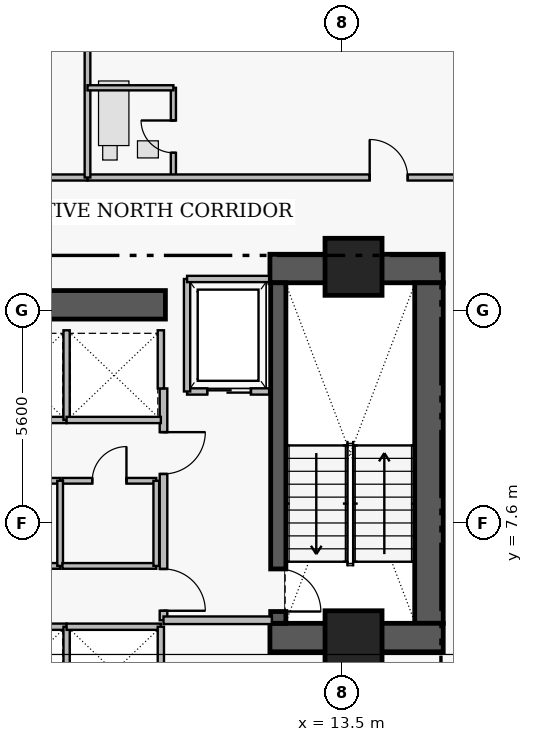
"""IFC4 building model, lengths in metres.
Left out: names, types, materials, properties, quantities, classifications, styles, units other than length and angle.
Written with IfcOpenShell. Run it as: python <this file> out.ifc"""

import sys

from ifc_helpers import new_model, si_unit, direction, frame, frame_2d, origin, origin_2d, place, context, subcontext, project, spatial, rectangle, extrude, element, fill, save


model = new_model("IFC4")
c1 = context("Model", 3, precision=1e-05, world=origin(), true_north=direction((0.0, 1.0)))
c2 = subcontext(c1, "Body", "Model", "MODEL_VIEW")
j1 = project(units=[si_unit("LENGTHUNIT", "METRE"), si_unit("PLANEANGLEUNIT", "RADIAN")], contexts=[c1])
p1 = place(None, origin())
s1 = spatial("IfcSite", under=j1, at=p1, CompositionType="ELEMENT")
p2 = place(p1, origin())
s2 = spatial("IfcBuilding", under=s1, at=p2, CompositionType="ELEMENT")
p3 = place(p2, frame((0.0, 0.0, 143.1)))
s3 = spatial("IfcBuildingStorey", under=s2, at=p3, CompositionType="ELEMENT", Elevation=143.1)
p4 = place(p3, frame((11.6, 14.305, 0.0), z_axis=(0.0, 0.0, 1.0), x_axis=(1.0, 0.0, 0.0)))
e1 = element("IfcWall", 1, at=p4, inside=s3, PredefinedType="SHEAR", context=c2, shape_type="SweptSolid", body=[
    extrude(rectangle(XDim=4.56, YDim=0.75, at=frame_2d((2.28, 0.0))), origin(), (0.0, 0.0, 1.0), 3.46),
])
p5 = place(p3, frame((15.785, 4.97, 0.0), z_axis=(0.0, 0.0, 1.0), x_axis=(0.0, 1.0, 0.0)))
e2 = element("IfcWall", 2, at=p5, inside=s3, PredefinedType="SHEAR", context=c2, shape_type="SweptSolid", body=[
    extrude(rectangle(XDim=8.96, YDim=0.75, at=frame_2d((4.48, 0.0))), origin(), (0.0, 0.0, 1.0), 3.46),
])
p6 = place(p3, frame((11.6, 4.595, 0.0), z_axis=(0.0, 0.0, 1.0), x_axis=(1.0, 0.0, 0.0)))
e3 = element("IfcWall", 3, at=p6, inside=s3, PredefinedType="SHEAR", context=c2, shape_type="SweptSolid", body=[
    extrude(rectangle(XDim=4.56, YDim=0.75, at=frame_2d((2.28, 0.0))), origin(), (0.0, 0.0, 1.0), 3.46),
])
p7 = place(p3, frame((1.25, 13.35, 0.0), z_axis=(0.0, 0.0, 1.0), x_axis=(1.0, 0.0, 0.0)))
e4 = element("IfcWall", 4, at=p7, inside=s3, PredefinedType="SHEAR", context=c2, shape_type="SweptSolid", body=[
    extrude(rectangle(XDim=7.6, YDim=0.75, at=frame_2d((3.8, 0.0))), origin(), (0.0, 0.0, 1.0), 3.43),
])
p8 = place(p3, frame((11.82, 13.93, 0.0), z_axis=(0.0, 0.0, 1.0), x_axis=(0.0, -1.0, 0.0)))
e5 = element("IfcWall", 5, at=p8, inside=s3, PredefinedType="SHEAR", context=c2, shape_type="SweptSolid", body=[
    extrude(rectangle(XDim=8.96, YDim=0.4, at=frame_2d((4.48, 0.0))), origin(), (0.0, 0.0, 1.0), 3.46),
])
p9 = place(p8, frame((7.53, 0.0, 0.0)))
e6 = element("IfcOpeningElement", 6, at=p9, cuts=e5, PredefinedType="OPENING", context=c2, shape_type="SweptSolid", body=[
    extrude(rectangle(XDim=1.12, YDim=2.22, at=frame_2d((0.56, 1.11))), frame((0.0, 0.21, 0.0), z_axis=(0.0, -1.0, 0.0), x_axis=(1.0, 0.0, 0.0)), (0.0, 0.0, 1.0), 0.42),
])
for number, where, z_axis, x_axis in (
    (7, (13.8, 14.35, 0.0), (0.0, 0.0, 1.0), (1.0, 0.0, 0.0)),
    (8, (13.8, 4.55, 0.0), (0.0, 0.0, 1.0), (1.0, 0.0, 0.0)),
):
    element("IfcColumn", number, at=place(p3, frame(where, z_axis=z_axis, x_axis=x_axis)), inside=s3, PredefinedType="COLUMN", context=c2, shape_type="SweptSolid", body=[
        extrude(rectangle(XDim=1.5, YDim=1.5, at=origin_2d()), origin(), (0.0, 0.0, 1.0), 3.65),
    ])
p10 = place(p3, frame((8.8, 11.15, 0.0), z_axis=(0.0, 0.0, 1.0), x_axis=(0.0, -1.0, 0.0)))
e9 = element("IfcWall", 9, at=p10, inside=s3, PredefinedType="PARTITIONING", context=c2, shape_type="SweptSolid", body=[
    extrude(rectangle(XDim=6.1, YDim=0.2, at=frame_2d((3.05, 0.0))), origin(), (0.0, 0.0, 1.0), 3.43),
])
p11 = place(p10, frame((1.15, 0.0, 0.0)))
e10 = element("IfcOpeningElement", 10, at=p11, cuts=e9, PredefinedType="OPENING", context=c2, shape_type="SweptSolid", body=[
    extrude(rectangle(XDim=1.1, YDim=2.2, at=frame_2d((0.55, 1.1))), frame((0.0, 0.11, 0.0), z_axis=(0.0, -1.0, 0.0), x_axis=(1.0, 0.0, 0.0)), (0.0, 0.0, 1.0), 0.22),
])
p12 = place(p10, frame((4.75, 0.0, 0.0)))
e11 = element("IfcOpeningElement", 11, at=p12, cuts=e9, PredefinedType="OPENING", context=c2, shape_type="SweptSolid", body=[
    extrude(rectangle(XDim=1.1, YDim=2.2, at=frame_2d((0.55, 1.1))), frame((0.0, 0.11, 0.0), z_axis=(0.0, -1.0, 0.0), x_axis=(1.0, 0.0, 0.0)), (0.0, 0.0, 1.0), 0.22),
])
p13 = place(p3, frame((9.42, 11.07, 0.0), z_axis=(0.0, 0.0, 1.0), x_axis=(1.0, 0.0, 0.0)))
e12 = element("IfcWall", 12, at=p13, inside=s3, PredefinedType="PARTITIONING", context=c2, shape_type="SweptSolid", body=[
    extrude(rectangle(XDim=2.16, YDim=0.165, at=frame_2d((1.08, 0.0))), origin(), (0.0, 0.0, 1.0), 3.43),
])
p14 = place(p13, frame((0.53, 0.0, 0.0)))
e13 = element("IfcOpeningElement", 13, at=p14, cuts=e12, PredefinedType="OPENING", context=c2, shape_type="SweptSolid", body=[
    extrude(rectangle(XDim=1.15, YDim=2.25, at=frame_2d((0.575, 1.125))), frame((0.0, 0.093, 0.0), z_axis=(0.0, -1.0, 0.0), x_axis=(1.0, 0.0, 0.0)), (0.0, 0.0, 1.0), 0.185),
])
p15 = place(p3, frame((3.7, 6.48, 0.0), z_axis=(0.0, 0.0, 1.0), x_axis=(1.0, 0.0, 0.0)))
e14 = element("IfcWall", 14, at=p15, inside=s3, PredefinedType="PARTITIONING", context=c2, shape_type="SweptSolid", body=[
    extrude(rectangle(XDim=2.38, YDim=0.15, at=frame_2d((1.19, 0.0))), origin(), (0.0, 0.0, 1.0), 3.43),
])
p16 = place(p15, frame((0.74, 0.0, 0.0)))
e15 = element("IfcOpeningElement", 15, at=p16, cuts=e14, PredefinedType="OPENING", context=c2, shape_type="SweptSolid", body=[
    extrude(rectangle(XDim=0.9, YDim=2.15, at=frame_2d((0.45, 1.075))), frame((0.0, 0.085, 0.0), z_axis=(0.0, -1.0, 0.0), x_axis=(1.0, 0.0, 0.0)), (0.0, 0.0, 1.0), 0.17),
])
p17 = place(p3, frame((6.14, 8.72, 0.0), z_axis=(0.0, 0.0, 1.0), x_axis=(1.0, 0.0, 0.0)))
e16 = element("IfcWall", 16, at=p17, inside=s3, PredefinedType="PARTITIONING", context=c2, shape_type="SweptSolid", body=[
    extrude(rectangle(XDim=2.47, YDim=0.15, at=frame_2d((1.235, 0.0))), origin(), (0.0, 0.0, 1.0), 3.43),
])
p18 = place(p17, frame((0.785, 0.0, 0.0)))
e17 = element("IfcOpeningElement", 17, at=p18, cuts=e16, PredefinedType="OPENING", context=c2, shape_type="SweptSolid", body=[
    extrude(rectangle(XDim=0.9, YDim=2.15, at=frame_2d((0.45, 1.075))), frame((0.0, 0.085, 0.0), z_axis=(0.0, -1.0, 0.0), x_axis=(1.0, 0.0, 0.0)), (0.0, 0.0, 1.0), 0.17),
])
p19 = place(p3, frame((-6.8, 16.7, 0.0), z_axis=(0.0, 0.0, 1.0), x_axis=(1.0, 0.0, 0.0)))
e18 = element("IfcWall", 18, at=p19, inside=s3, PredefinedType="PARTITIONING", context=c2, shape_type="SweptSolid", body=[
    extrude(rectangle(XDim=13.6, YDim=0.16, at=frame_2d((6.8, 0.0))), origin(), (0.0, 0.0, 1.0), 2.973),
])
p20 = place(p19, frame((7.45, 0.0, 0.0)))
e19 = element("IfcOpeningElement", 19, at=p20, cuts=e18, PredefinedType="OPENING", context=c2, shape_type="SweptSolid", body=[
    extrude(rectangle(XDim=1.0, YDim=2.15, at=frame_2d((0.5, 1.075))), frame((0.0, 0.09, 0.0), z_axis=(0.0, -1.0, 0.0), x_axis=(1.0, 0.0, 0.0)), (0.0, 0.0, 1.0), 0.18),
])
p21 = place(p3, frame((9.06, 16.7, 0.0), z_axis=(0.0, 0.0, 1.0), x_axis=(0.0, 1.0, 0.0)))
e20 = element("IfcWall", 20, at=p21, inside=s3, PredefinedType="PLUMBINGWALL", context=c2, shape_type="SweptSolid", body=[
    extrude(rectangle(XDim=2.36, YDim=0.135, at=frame_2d((1.18, 0.0))), origin(), (0.0, 0.0, 1.0), 3.43),
])
p22 = place(p21, frame((0.65, 0.0, 0.0)))
e21 = element("IfcOpeningElement", 21, at=p22, cuts=e20, PredefinedType="OPENING", context=c2, shape_type="SweptSolid", body=[
    extrude(rectangle(XDim=0.85, YDim=2.1, at=frame_2d((0.425, 1.05))), frame((0.0, 0.077, 0.0), z_axis=(0.0, -1.0, 0.0), x_axis=(1.0, 0.0, 0.0)), (0.0, 0.0, 1.0), 0.155),
])
p23 = place(p3, frame((6.8, 16.7, 0.0), z_axis=(0.0, 0.0, 1.0), x_axis=(1.0, 0.0, 0.0)))
e22 = element("IfcWall", 22, at=p23, inside=s3, PredefinedType="PARTITIONING", context=c2, shape_type="SweptSolid", body=[
    extrude(rectangle(XDim=13.8, YDim=0.16, at=frame_2d((6.9, 0.0))), origin(), (0.0, 0.0, 1.0), 2.973),
])
p24 = place(p23, frame((7.425, 0.0, 0.0)))
e23 = element("IfcOpeningElement", 23, at=p24, cuts=e22, PredefinedType="OPENING", context=c2, shape_type="SweptSolid", body=[
    extrude(rectangle(XDim=1.0, YDim=2.15, at=frame_2d((0.5, 1.075))), frame((0.0, 0.09, 0.0), z_axis=(0.0, -1.0, 0.0), x_axis=(1.0, 0.0, 0.0)), (0.0, 0.0, 1.0), 0.18),
])
p25 = place(p3, frame((8.8, 5.05, 0.0), z_axis=(0.0, 0.0, 1.0), x_axis=(1.0, 0.0, 0.0)))
e24 = element("IfcWall", 24, at=p25, inside=s3, PredefinedType="PARTITIONING", context=c2, shape_type="SweptSolid", body=[
    extrude(rectangle(XDim=2.85, YDim=0.2, at=frame_2d((1.425, 0.0))), origin(), (0.0, 0.0, 1.0), 3.43),
])
p26 = place(p3, frame((9.42, 11.07, 0.0), z_axis=(0.0, 0.0, 1.0), x_axis=(0.0, 1.0, 0.0)))
e25 = element("IfcWall", 25, at=p26, inside=s3, PredefinedType="PARTITIONING", context=c2, shape_type="SweptSolid", body=[
    extrude(rectangle(XDim=2.96, YDim=0.165, at=frame_2d((1.48, 0.0))), origin(), (0.0, 0.0, 1.0), 3.43),
])
p27 = place(p3, frame((9.42, 14.03, 0.0), z_axis=(0.0, 0.0, 1.0), x_axis=(1.0, 0.0, 0.0)))
e26 = element("IfcWall", 26, at=p27, inside=s3, PredefinedType="PARTITIONING", context=c2, shape_type="SweptSolid", body=[
    extrude(rectangle(XDim=2.16, YDim=0.165, at=frame_2d((1.08, 0.0))), origin(), (0.0, 0.0, 1.0), 3.43),
])
p28 = place(p3, frame((3.75, 4.88, 0.0), z_axis=(0.0, 0.0, 1.0), x_axis=(1.0, 0.0, 0.0)))
e27 = element("IfcWall", 27, at=p28, inside=s3, PredefinedType="PARTITIONING", context=c2, shape_type="SweptSolid", body=[
    extrude(rectangle(XDim=2.5, YDim=0.165, at=frame_2d((1.25, 0.0))), origin(), (0.0, 0.0, 1.0), 3.43),
])
p29 = place(p3, frame((6.25, 2.52, 0.0), z_axis=(0.0, 0.0, 1.0), x_axis=(0.0, 1.0, 0.0)))
e28 = element("IfcWall", 28, at=p29, inside=s3, PredefinedType="PARTITIONING", context=c2, shape_type="SweptSolid", body=[
    extrude(rectangle(XDim=2.36, YDim=0.165, at=frame_2d((1.18, 0.0))), origin(), (0.0, 0.0, 1.0), 3.43),
])
p30 = place(p3, frame((6.25, 4.88, 0.0), z_axis=(0.0, 0.0, 1.0), x_axis=(1.0, 0.0, 0.0)))
e29 = element("IfcWall", 29, at=p30, inside=s3, PredefinedType="PARTITIONING", context=c2, shape_type="SweptSolid", body=[
    extrude(rectangle(XDim=2.48, YDim=0.165, at=frame_2d((1.24, 0.0))), origin(), (0.0, 0.0, 1.0), 3.43),
])
p31 = place(p3, frame((8.73, 2.52, 0.0), z_axis=(0.0, 0.0, 1.0), x_axis=(0.0, 1.0, 0.0)))
e30 = element("IfcWall", 30, at=p31, inside=s3, PredefinedType="PARTITIONING", context=c2, shape_type="SweptSolid", body=[
    extrude(rectangle(XDim=2.36, YDim=0.165, at=frame_2d((1.18, 0.0))), origin(), (0.0, 0.0, 1.0), 3.43),
])
p32 = place(p3, frame((3.75, 10.32, 0.0), z_axis=(0.0, 0.0, 1.0), x_axis=(1.0, 0.0, 0.0)))
e31 = element("IfcWall", 31, at=p32, inside=s3, PredefinedType="PARTITIONING", context=c2, shape_type="SweptSolid", body=[
    extrude(rectangle(XDim=2.5, YDim=0.165, at=frame_2d((1.25, 0.0))), origin(), (0.0, 0.0, 1.0), 3.43),
])
p33 = place(p3, frame((6.25, 10.32, 0.0), z_axis=(0.0, 0.0, 1.0), x_axis=(0.0, 1.0, 0.0)))
e32 = element("IfcWall", 32, at=p33, inside=s3, PredefinedType="PARTITIONING", context=c2, shape_type="SweptSolid", body=[
    extrude(rectangle(XDim=2.36, YDim=0.165, at=frame_2d((1.18, 0.0))), origin(), (0.0, 0.0, 1.0), 3.43),
])
p34 = place(p3, frame((6.25, 10.32, 0.0), z_axis=(0.0, 0.0, 1.0), x_axis=(1.0, 0.0, 0.0)))
e33 = element("IfcWall", 33, at=p34, inside=s3, PredefinedType="PARTITIONING", context=c2, shape_type="SweptSolid", body=[
    extrude(rectangle(XDim=2.48, YDim=0.165, at=frame_2d((1.24, 0.0))), origin(), (0.0, 0.0, 1.0), 3.43),
])
p35 = place(p3, frame((8.73, 11.15, 0.0), z_axis=(0.0, 0.0, 1.0), x_axis=(0.0, 1.0, 0.0)))
e34 = element("IfcWall", 34, at=p35, inside=s3, PredefinedType="PARTITIONING", context=c2, shape_type="SweptSolid", body=[
    extrude(rectangle(XDim=1.53, YDim=0.165, at=frame_2d((0.765, 0.0))), origin(), (0.0, 0.0, 1.0), 3.43),
])
p36 = place(p3, frame((3.7, 8.72, 0.0), z_axis=(0.0, 0.0, 1.0), x_axis=(1.0, 0.0, 0.0)))
e35 = element("IfcWall", 35, at=p36, inside=s3, PredefinedType="PARTITIONING", context=c2, shape_type="SweptSolid", body=[
    extrude(rectangle(XDim=2.38, YDim=0.15, at=frame_2d((1.19, 0.0))), origin(), (0.0, 0.0, 1.0), 3.43),
])
p37 = place(p3, frame((6.08, 6.48, 0.0), z_axis=(0.0, 0.0, 1.0), x_axis=(0.0, 1.0, 0.0)))
e36 = element("IfcWall", 36, at=p37, inside=s3, PredefinedType="PARTITIONING", context=c2, shape_type="SweptSolid", body=[
    extrude(rectangle(XDim=2.24, YDim=0.15, at=frame_2d((1.12, 0.0))), origin(), (0.0, 0.0, 1.0), 3.43),
])
p38 = place(p3, frame((6.14, 6.48, 0.0), z_axis=(0.0, 0.0, 1.0), x_axis=(1.0, 0.0, 0.0)))
e37 = element("IfcWall", 37, at=p38, inside=s3, PredefinedType="PARTITIONING", context=c2, shape_type="SweptSolid", body=[
    extrude(rectangle(XDim=2.47, YDim=0.15, at=frame_2d((1.235, 0.0))), origin(), (0.0, 0.0, 1.0), 3.43),
])
p39 = place(p3, frame((8.61, 6.48, 0.0), z_axis=(0.0, 0.0, 1.0), x_axis=(0.0, 1.0, 0.0)))
e38 = element("IfcWall", 38, at=p39, inside=s3, PredefinedType="PARTITIONING", context=c2, shape_type="SweptSolid", body=[
    extrude(rectangle(XDim=2.24, YDim=0.15, at=frame_2d((1.12, 0.0))), origin(), (0.0, 0.0, 1.0), 3.43),
])
p40 = place(p3, frame((6.8, 16.7, 0.0), z_axis=(0.0, 0.0, 1.0), x_axis=(0.0, 1.0, 0.0)))
e39 = element("IfcWall", 39, at=p40, inside=s3, PredefinedType="PARTITIONING", context=c2, shape_type="SweptSolid", body=[
    extrude(rectangle(XDim=11.62, YDim=0.15, at=frame_2d((5.81, 0.0))), origin(), (0.0, 0.0, 1.0), 3.43),
])
p41 = place(p3, frame((6.8, 19.06, 0.0), z_axis=(0.0, 0.0, 1.0), x_axis=(1.0, 0.0, 0.0)))
e40 = element("IfcWall", 40, at=p41, inside=s3, PredefinedType="PLUMBINGWALL", context=c2, shape_type="SweptSolid", body=[
    extrude(rectangle(XDim=2.26, YDim=0.135, at=frame_2d((1.13, 0.0))), origin(), (0.0, 0.0, 1.0), 2.973),
])
p42 = place(p9, origin())
e41 = element("IfcDoor", 41, at=p42, inside=s3, OperationType="SINGLE_SWING_RIGHT", PredefinedType="DOOR", context=c2, shape_type="SweptSolid", body=[
    extrude(rectangle(XDim=1.12, YDim=2.22, at=frame_2d((0.56, 1.11))), frame((0.0, 0.025, 0.0), z_axis=(0.0, -1.0, 0.0), x_axis=(1.0, 0.0, 0.0)), (0.0, 0.0, 1.0), 0.05),
])
fill(e6, e41)
p43 = place(p11, origin())
e42 = element("IfcDoor", 42, at=p43, inside=s3, OperationType="SINGLE_SWING_LEFT", PredefinedType="DOOR", context=c2, shape_type="SweptSolid", body=[
    extrude(rectangle(XDim=1.1, YDim=2.2, at=frame_2d((0.55, 1.1))), frame((0.0, 0.025, 0.0), z_axis=(0.0, -1.0, 0.0), x_axis=(1.0, 0.0, 0.0)), (0.0, 0.0, 1.0), 0.05),
])
fill(e10, e42)
p44 = place(p12, origin())
e43 = element("IfcDoor", 43, at=p44, inside=s3, OperationType="SINGLE_SWING_RIGHT", PredefinedType="DOOR", context=c2, shape_type="SweptSolid", body=[
    extrude(rectangle(XDim=1.1, YDim=2.2, at=frame_2d((0.55, 1.1))), frame((0.0, 0.025, 0.0), z_axis=(0.0, -1.0, 0.0), x_axis=(1.0, 0.0, 0.0)), (0.0, 0.0, 1.0), 0.05),
])
fill(e11, e43)
p45 = place(p14, origin())
e44 = element("IfcDoor", 44, at=p45, inside=s3, OperationType="SLIDING_TO_LEFT", PredefinedType="DOOR", context=c2, shape_type="SweptSolid", body=[
    extrude(rectangle(XDim=1.15, YDim=2.25, at=frame_2d((0.575, 1.125))), frame((0.0, 0.025, 0.0), z_axis=(0.0, -1.0, 0.0), x_axis=(1.0, 0.0, 0.0)), (0.0, 0.0, 1.0), 0.05),
])
fill(e13, e44)
p46 = place(p18, origin())
e45 = element("IfcDoor", 45, at=p46, inside=s3, OperationType="SINGLE_SWING_RIGHT", PredefinedType="DOOR", context=c2, shape_type="SweptSolid", body=[
    extrude(rectangle(XDim=0.9, YDim=2.15, at=frame_2d((0.45, 1.075))), frame((0.0, 0.025, 0.0), z_axis=(0.0, -1.0, 0.0), x_axis=(1.0, 0.0, 0.0)), (0.0, 0.0, 1.0), 0.05),
])
fill(e17, e45)
p47 = place(p22, origin())
e46 = element("IfcDoor", 46, at=p47, inside=s3, OperationType="SINGLE_SWING_RIGHT", PredefinedType="DOOR", context=c2, shape_type="SweptSolid", body=[
    extrude(rectangle(XDim=0.85, YDim=2.1, at=frame_2d((0.425, 1.05))), frame((0.0, 0.025, 0.0), z_axis=(0.0, -1.0, 0.0), x_axis=(1.0, 0.0, 0.0)), (0.0, 0.0, 1.0), 0.05),
])
fill(e21, e46)
p48 = place(p24, origin())
e47 = element("IfcDoor", 47, at=p48, inside=s3, OperationType="SINGLE_SWING_LEFT", PredefinedType="DOOR", context=c2, shape_type="SweptSolid", body=[
    extrude(rectangle(XDim=1.0, YDim=2.15, at=frame_2d((0.5, 1.075))), frame((0.0, 0.025, 0.0), z_axis=(0.0, -1.0, 0.0), x_axis=(1.0, 0.0, 0.0)), (0.0, 0.0, 1.0), 0.05),
])
fill(e23, e47)
save(model, sys.argv[1])
